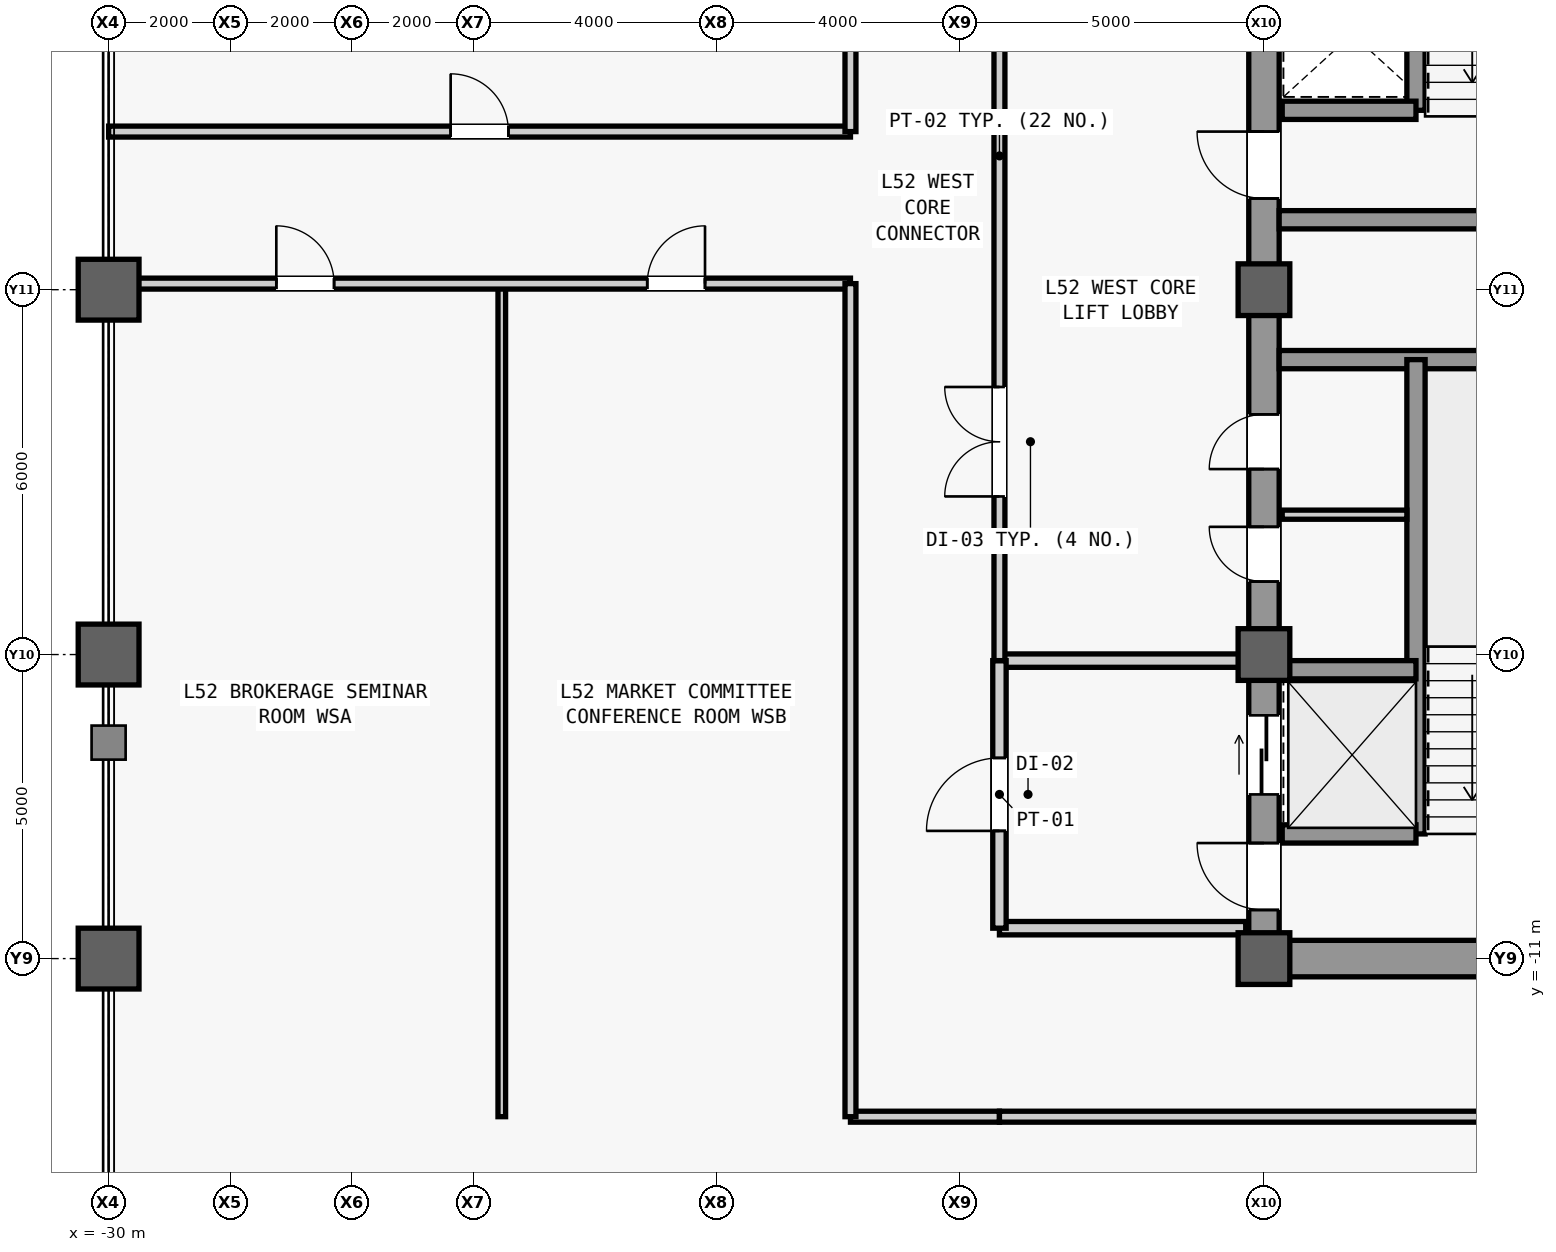
"""IFC4 building model, lengths in metres.
Left out: names, types, materials, properties, quantities, classifications, styles, units other than length and angle.
Written with IfcOpenShell. Run it as: python <this file> out.ifc"""

import sys

from ifc_helpers import new_model, si_unit, direction, frame, frame_2d, origin, origin_2d, place, context, subcontext, project, spatial, rectangle, hollow_rectangle, extrude, source, transform, mapped, element, fill, save


model = new_model("IFC4")
c1 = context("Model", 3, precision=1e-05, world=origin(), true_north=direction((0.0, 1.0)))
c2 = subcontext(c1, "Body", "Model", "MODEL_VIEW")
j1 = project(units=[si_unit("LENGTHUNIT", "METRE"), si_unit("PLANEANGLEUNIT", "RADIAN")], contexts=[c1])
p1 = place(None, origin())
s1 = spatial("IfcSite", under=j1, at=p1, CompositionType="ELEMENT")
p2 = place(p1, origin())
s2 = spatial("IfcBuilding", under=s1, at=p2, CompositionType="ELEMENT")
p3 = place(p2, frame((0.0, 0.0, 223.1)))
s3 = spatial("IfcBuildingStorey", under=s2, at=p3, CompositionType="ELEMENT", Elevation=223.1)
m1 = source(origin(), c2, "Body", "SweptSolid", [
    extrude(rectangle(XDim=22.0, YDim=0.5, at=frame_2d((11.0, 0.0))), origin(), (0.0, 0.0, 1.0), 3.78),
])
p4 = place(p3, frame((-11.0, -11.0, 0.0), z_axis=(0.0, 0.0, 1.0), x_axis=(0.0, 1.0, 0.0)))
e1 = element("IfcWall", 1, at=p4, inside=s3, PredefinedType="SHEAR", context=c2, shape_type="MappedRepresentation", body=[
    mapped(m1, transform((0.0, 0.0, 0.0), scale=1.0)),
])
m2 = source(origin(), c2, "Body", "SweptSolid", [
    extrude(rectangle(XDim=1.1, YDim=2.2, at=frame_2d((0.55, 1.1))), frame((0.0, 0.26, 0.0), z_axis=(0.0, -1.0, 0.0), x_axis=(1.0, 0.0, 0.0)), (0.0, 0.0, 1.0), 0.52),
])
p5 = place(p4, frame((0.8, 0.0, 0.0)))
e2 = element("IfcOpeningElement", 2, at=p5, cuts=e1, PredefinedType="OPENING", context=c2, shape_type="MappedRepresentation", body=[
    mapped(m2, transform((0.0, 0.0, 0.0), scale=1.0)),
])
p6 = place(p4, frame((12.5, 0.0, 0.0)))
e3 = element("IfcOpeningElement", 3, at=p6, cuts=e1, PredefinedType="OPENING", context=c2, shape_type="MappedRepresentation", body=[
    mapped(m2, transform((0.0, 0.0, 0.0), scale=1.0)),
])
m3 = source(origin(), c2, "Body", "SweptSolid", [
    extrude(rectangle(XDim=0.9, YDim=2.15, at=frame_2d((0.45, 1.075))), frame((0.0, 0.26, 0.0), z_axis=(0.0, -1.0, 0.0), x_axis=(1.0, 0.0, 0.0)), (0.0, 0.0, 1.0), 0.52),
])
p7 = place(p4, frame((6.2, 0.0, 0.0)))
e4 = element("IfcOpeningElement", 4, at=p7, cuts=e1, PredefinedType="OPENING", context=c2, shape_type="MappedRepresentation", body=[
    mapped(m3, transform((0.0, 0.0, 0.0), scale=1.0)),
])
p8 = place(p4, frame((8.05, 0.0, 0.0)))
e5 = element("IfcOpeningElement", 5, at=p8, cuts=e1, PredefinedType="OPENING", context=c2, shape_type="MappedRepresentation", body=[
    mapped(m3, transform((0.0, 0.0, 0.0), scale=1.0)),
])
m4 = source(origin(), c2, "Body", "SweptSolid", [
    extrude(rectangle(XDim=1.3, YDim=2.3, at=frame_2d((0.65, 1.15))), frame((0.0, 0.26, 0.0), z_axis=(0.0, -1.0, 0.0), x_axis=(1.0, 0.0, 0.0)), (0.0, 0.0, 1.0), 0.52),
])
p9 = place(p4, frame((2.7, 0.0, 0.0)))
e6 = element("IfcOpeningElement", 6, at=p9, cuts=e1, PredefinedType="OPENING", context=c2, shape_type="MappedRepresentation", body=[
    mapped(m4, transform((0.0, 0.0, 0.0), scale=1.0)),
])
m5 = source(origin(), c2, "Body", "SweptSolid", [
    extrude(rectangle(XDim=5.9, YDim=0.6, at=frame_2d((2.95, 0.0))), origin(), (0.0, 0.0, 1.0), 3.78),
])
p10 = place(p3, frame((-10.75, -11.0, 0.0), z_axis=(0.0, 0.0, 1.0), x_axis=(1.0, 0.0, 0.0)))
e7 = element("IfcWall", 7, at=p10, inside=s3, PredefinedType="SHEAR", context=c2, shape_type="MappedRepresentation", body=[
    mapped(m5, transform((0.0, 0.0, 0.0), scale=1.0)),
])
m6 = source(origin(), c2, "Body", "SweptSolid", [
    extrude(rectangle(XDim=5.65, YDim=0.3, at=frame_2d((2.825, 0.0))), origin(), (0.0, 0.0, 1.0), 3.78),
])
for number, where, z_axis, x_axis in (
    (8, (-10.75, -1.15, 0.0), (0.0, 0.0, 1.0), (1.0, 0.0, 0.0)),
    (9, (-10.75, 1.15, 0.0), (0.0, 0.0, 1.0), (1.0, 0.0, 0.0)),
):
    element("IfcWall", number, at=place(p3, frame(where, z_axis=z_axis, x_axis=x_axis)), inside=s3, PredefinedType="SHEAR", context=c2, shape_type="MappedRepresentation", body=[
        mapped(m6, transform((0.0, 0.0, 0.0), scale=1.0)),
    ])
m7 = source(origin(), c2, "Body", "SweptSolid", [
    extrude(hollow_rectangle(XDim=1.0, YDim=1.0, WallThickness=0.055, at=origin_2d()), origin(), (0.0, 0.0, 1.0), 4.0),
])
for number, where, z_axis, x_axis in (
    (10, (-30.0, -11.0, 0.0), (0.0, 0.0, 1.0), (1.0, 0.0, 0.0)),
    (11, (-30.0, -6.0, 0.0), (0.0, 0.0, 1.0), (1.0, 0.0, 0.0)),
    (12, (-30.0, 0.0, 0.0), (0.0, 0.0, 1.0), (1.0, 0.0, 0.0)),
):
    element("IfcColumn", number, at=place(p3, frame(where, z_axis=z_axis, x_axis=x_axis)), inside=s3, PredefinedType="COLUMN", context=c2, shape_type="MappedRepresentation", body=[
        mapped(m7, transform((0.0, 0.0, 0.0), scale=1.0)),
    ])
m8 = source(origin(), c2, "Body", "SweptSolid", [
    extrude(rectangle(XDim=0.85, YDim=0.85, at=origin_2d()), origin(), (0.0, 0.0, 1.0), 4.0),
])
for number, where, z_axis, x_axis in (
    (13, (-11.0, -11.0, 0.0), (0.0, 0.0, 1.0), (1.0, 0.0, 0.0)),
    (14, (-11.0, -6.0, 0.0), (0.0, 0.0, 1.0), (1.0, 0.0, 0.0)),
    (15, (-11.0, 0.0, 0.0), (0.0, 0.0, 1.0), (1.0, 0.0, 0.0)),
):
    element("IfcColumn", number, at=place(p3, frame(where, z_axis=z_axis, x_axis=x_axis)), inside=s3, PredefinedType="COLUMN", context=c2, shape_type="MappedRepresentation", body=[
        mapped(m8, transform((0.0, 0.0, 0.0), scale=1.0)),
    ])
m9 = source(origin(), c2, "Body", "SweptSolid", [
    extrude(rectangle(XDim=7.8, YDim=0.3, at=frame_2d((3.9, 0.0))), origin(), (0.0, 0.0, 1.0), 3.78),
])
p11 = place(p3, frame((-8.5, -8.95, 0.0), z_axis=(0.0, 0.0, 1.0), x_axis=(0.0, 1.0, 0.0)))
e16 = element("IfcWall", 16, at=p11, inside=s3, PredefinedType="SHEAR", context=c2, shape_type="MappedRepresentation", body=[
    mapped(m9, transform((0.0, 0.0, 0.0), scale=1.0)),
])
m10 = source(origin(), c2, "Body", "SweptSolid", [
    extrude(rectangle(XDim=2.2, YDim=0.3, at=frame_2d((1.1, 0.0))), origin(), (0.0, 0.0, 1.0), 3.78),
])
for number, where, z_axis, x_axis in (
    (17, (-10.7, -8.95, 0.0), (0.0, 0.0, 1.0), (1.0, 0.0, 0.0)),
    (18, (-10.7, -6.25, 0.0), (0.0, 0.0, 1.0), (1.0, 0.0, 0.0)),
):
    element("IfcWall", number, at=place(p3, frame(where, z_axis=z_axis, x_axis=x_axis)), inside=s3, PredefinedType="SHEAR", context=c2, shape_type="MappedRepresentation", body=[
        mapped(m10, transform((0.0, 0.0, 0.0), scale=1.0)),
    ])
m11 = source(origin(), c2, "Body", "SweptSolid", [
    extrude(rectangle(XDim=7.75, YDim=0.3, at=frame_2d((3.875, 0.0))), origin(), (0.0, 0.0, 1.0), 3.78),
])
p12 = place(p3, frame((-8.5, 2.95, 0.0), z_axis=(0.0, 0.0, 1.0), x_axis=(0.0, 1.0, 0.0)))
e19 = element("IfcWall", 19, at=p12, inside=s3, PredefinedType="SHEAR", context=c2, shape_type="MappedRepresentation", body=[
    mapped(m11, transform((0.0, 0.0, 0.0), scale=1.0)),
])
p13 = place(p3, frame((-10.7, 2.95, 0.0), z_axis=(0.0, 0.0, 1.0), x_axis=(1.0, 0.0, 0.0)))
e20 = element("IfcWall", 20, at=p13, inside=s3, PredefinedType="SHEAR", context=c2, shape_type="MappedRepresentation", body=[
    mapped(m10, transform((0.0, 0.0, 0.0), scale=1.0)),
])
m12 = source(origin(), c2, "Body", "SweptSolid", [
    extrude(rectangle(XDim=2.05, YDim=0.15, at=frame_2d((1.025, 0.0))), origin(), (0.0, 0.0, 1.0), 3.78),
])
p14 = place(p3, frame((-10.7, -3.7, 0.0), z_axis=(0.0, 0.0, 1.0), x_axis=(1.0, 0.0, 0.0)))
e21 = element("IfcWall", 21, at=p14, inside=s3, PredefinedType="PARTITIONING", context=c2, shape_type="MappedRepresentation", body=[
    mapped(m12, transform((0.0, 0.0, 0.0), scale=1.0)),
])
m13 = source(origin(), c2, "Body", "SweptSolid", [
    extrude(rectangle(XDim=4.05, YDim=0.22, at=frame_2d((2.025, 0.0))), origin(), (0.0, 0.0, 1.0), 3.78),
])
p15 = place(p3, frame((-15.35, -10.5, 0.0), z_axis=(0.0, 0.0, 1.0), x_axis=(1.0, 0.0, 0.0)))
e22 = element("IfcWall", 22, at=p15, inside=s3, PredefinedType="PARTITIONING", context=c2, shape_type="MappedRepresentation", body=[
    mapped(m13, transform((0.0, 0.0, 0.0), scale=1.0)),
])
m14 = source(origin(), c2, "Body", "SweptSolid", [
    extrude(rectangle(XDim=4.05, YDim=0.22, at=frame_2d((2.025, 0.0))), origin(), (0.0, 0.0, 1.0), 3.085),
])
p16 = place(p3, frame((-15.35, -6.1, 0.0), z_axis=(0.0, 0.0, 1.0), x_axis=(1.0, 0.0, 0.0)))
e23 = element("IfcWall", 23, at=p16, inside=s3, PredefinedType="PARTITIONING", context=c2, shape_type="MappedRepresentation", body=[
    mapped(m14, transform((0.0, 0.0, 0.0), scale=1.0)),
])
m15 = source(origin(), c2, "Body", "SweptSolid", [
    extrude(rectangle(XDim=4.4, YDim=0.22, at=frame_2d((2.2, 0.0))), origin(), (0.0, 0.0, 1.0), 3.78),
])
p17 = place(p3, frame((-15.35, -10.5, 0.0), z_axis=(0.0, 0.0, 1.0), x_axis=(0.0, 1.0, 0.0)))
e24 = element("IfcWall", 24, at=p17, inside=s3, PredefinedType="PARTITIONING", context=c2, shape_type="MappedRepresentation", body=[
    mapped(m15, transform((0.0, 0.0, 0.0), scale=1.0)),
])
m16 = source(origin(), c2, "Body", "SweptSolid", [
    extrude(rectangle(XDim=1.2, YDim=2.2, at=frame_2d((0.6, 1.1))), frame((0.0, 0.12, 0.0), z_axis=(0.0, -1.0, 0.0), x_axis=(1.0, 0.0, 0.0)), (0.0, 0.0, 1.0), 0.24),
])
p18 = place(p17, frame((1.6, 0.0, 0.0)))
e25 = element("IfcOpeningElement", 25, at=p18, cuts=e24, PredefinedType="OPENING", context=c2, shape_type="MappedRepresentation", body=[
    mapped(m16, transform((0.0, 0.0, 0.0), scale=1.0)),
])
m17 = source(origin(), c2, "Body", "SweptSolid", [
    extrude(rectangle(XDim=16.6, YDim=0.18, at=frame_2d((8.3, 0.0))), origin(), (0.0, 0.0, 1.0), 3.78),
])
p19 = place(p3, frame((-15.35, -6.1, 0.0), z_axis=(0.0, 0.0, 1.0), x_axis=(0.0, 1.0, 0.0)))
e26 = element("IfcWall", 26, at=p19, inside=s3, PredefinedType="PARTITIONING", context=c2, shape_type="MappedRepresentation", body=[
    mapped(m17, transform((0.0, 0.0, 0.0), scale=1.0)),
])
m18 = source(origin(), c2, "Body", "SweptSolid", [
    extrude(rectangle(XDim=1.8, YDim=2.25, at=frame_2d((0.9, 1.125))), frame((0.0, 0.1, 0.0), z_axis=(0.0, -1.0, 0.0), x_axis=(1.0, 0.0, 0.0)), (0.0, 0.0, 1.0), 0.2),
])
p20 = place(p19, frame((2.7, 0.0, 0.0)))
e27 = element("IfcOpeningElement", 27, at=p20, cuts=e26, PredefinedType="OPENING", context=c2, shape_type="MappedRepresentation", body=[
    mapped(m18, transform((0.0, 0.0, 0.0), scale=1.0)),
])
p21 = place(p19, frame((11.0, 0.0, 0.0)))
e28 = element("IfcOpeningElement", 28, at=p21, cuts=e26, PredefinedType="OPENING", context=c2, shape_type="MappedRepresentation", body=[
    mapped(m18, transform((0.0, 0.0, 0.0), scale=1.0)),
])
m19 = source(origin(), c2, "Body", "SweptSolid", [
    extrude(rectangle(XDim=2.45, YDim=0.18, at=frame_2d((1.225, 0.0))), origin(), (0.0, 0.0, 1.0), 3.78),
])
p22 = place(p3, frame((-17.8, -13.6, 0.0), z_axis=(0.0, 0.0, 1.0), x_axis=(1.0, 0.0, 0.0)))
e29 = element("IfcWall", 29, at=p22, inside=s3, PredefinedType="PARTITIONING", context=c2, shape_type="MappedRepresentation", body=[
    mapped(m19, transform((0.0, 0.0, 0.0), scale=1.0)),
])
m20 = source(origin(), c2, "Body", "SweptSolid", [
    extrude(rectangle(XDim=20.35, YDim=0.18, at=frame_2d((10.175, 0.0))), origin(), (0.0, 0.0, 1.0), 3.78),
])
p23 = place(p3, frame((-15.35, -13.6, 0.0), z_axis=(0.0, 0.0, 1.0), x_axis=(1.0, 0.0, 0.0)))
e30 = element("IfcWall", 30, at=p23, inside=s3, PredefinedType="PARTITIONING", context=c2, shape_type="MappedRepresentation", body=[
    mapped(m20, transform((0.0, 0.0, 0.0), scale=1.0)),
])
m21 = source(origin(), c2, "Body", "SweptSolid", [
    extrude(rectangle(XDim=13.7, YDim=0.125, at=frame_2d((6.85, 0.0))), origin(), (0.0, 0.0, 1.0), 3.78),
])
p24 = place(p3, frame((-23.534, -13.6, 0.0), z_axis=(0.0, 0.0, 1.0), x_axis=(0.0, 1.0, 0.0)))
e31 = element("IfcWall", 31, at=p24, inside=s3, PredefinedType="PARTITIONING", context=c2, shape_type="MappedRepresentation", body=[
    mapped(m21, transform((0.0, 0.0, 0.0), scale=1.0)),
])
m22 = source(origin(), c2, "Body", "SweptSolid", [
    extrude(rectangle(XDim=12.2, YDim=0.18, at=frame_2d((6.1, 0.0))), origin(), (0.0, 0.0, 1.0), 3.085),
])
p25 = place(p3, frame((-30.0, 0.1, 0.0), z_axis=(0.0, 0.0, 1.0), x_axis=(1.0, 0.0, 0.0)))
e32 = element("IfcWall", 32, at=p25, inside=s3, PredefinedType="PARTITIONING", context=c2, shape_type="MappedRepresentation", body=[
    mapped(m22, transform((0.0, 0.0, 0.0), scale=1.0)),
])
m23 = source(origin(), c2, "Body", "SweptSolid", [
    extrude(rectangle(XDim=0.95, YDim=2.15, at=frame_2d((0.475, 1.075))), frame((0.0, 0.1, 0.0), z_axis=(0.0, -1.0, 0.0), x_axis=(1.0, 0.0, 0.0)), (0.0, 0.0, 1.0), 0.2),
])
p26 = place(p25, frame((2.758, 0.0, 0.0)))
e33 = element("IfcOpeningElement", 33, at=p26, cuts=e32, PredefinedType="OPENING", context=c2, shape_type="MappedRepresentation", body=[
    mapped(m23, transform((0.0, 0.0, 0.0), scale=1.0)),
])
p27 = place(p25, frame((8.858, 0.0, 0.0)))
e34 = element("IfcOpeningElement", 34, at=p27, cuts=e32, PredefinedType="OPENING", context=c2, shape_type="MappedRepresentation", body=[
    mapped(m23, transform((0.0, 0.0, 0.0), scale=1.0)),
])
m24 = source(origin(), c2, "Body", "SweptSolid", [
    extrude(rectangle(XDim=13.7, YDim=0.18, at=frame_2d((6.85, 0.0))), origin(), (0.0, 0.0, 1.0), 3.78),
])
p28 = place(p3, frame((-17.8, -13.6, 0.0), z_axis=(0.0, 0.0, 1.0), x_axis=(0.0, 1.0, 0.0)))
e35 = element("IfcWall", 35, at=p28, inside=s3, PredefinedType="PARTITIONING", context=c2, shape_type="MappedRepresentation", body=[
    mapped(m24, transform((0.0, 0.0, 0.0), scale=1.0)),
])
m25 = source(origin(), c2, "Body", "SweptSolid", [
    extrude(rectangle(XDim=12.2, YDim=0.18, at=frame_2d((6.1, 0.0))), origin(), (0.0, 0.0, 1.0), 3.78),
])
p29 = place(p3, frame((-30.0, 2.6, 0.0), z_axis=(0.0, 0.0, 1.0), x_axis=(1.0, 0.0, 0.0)))
e36 = element("IfcWall", 36, at=p29, inside=s3, PredefinedType="PARTITIONING", context=c2, shape_type="MappedRepresentation", body=[
    mapped(m25, transform((0.0, 0.0, 0.0), scale=1.0)),
])
p30 = place(p29, frame((5.625, 0.0, 0.0)))
e37 = element("IfcOpeningElement", 37, at=p30, cuts=e36, PredefinedType="OPENING", context=c2, shape_type="MappedRepresentation", body=[
    mapped(m23, transform((0.0, 0.0, 0.0), scale=1.0)),
])
m26 = source(origin(), c2, "Body", "SweptSolid", [
    extrude(rectangle(XDim=7.9, YDim=0.18, at=frame_2d((3.95, 0.0))), origin(), (0.0, 0.0, 1.0), 3.78),
])
p31 = place(p3, frame((-17.8, 2.6, 0.0), z_axis=(0.0, 0.0, 1.0), x_axis=(0.0, 1.0, 0.0)))
e38 = element("IfcWall", 38, at=p31, inside=s3, PredefinedType="PARTITIONING", context=c2, shape_type="MappedRepresentation", body=[
    mapped(m26, transform((0.0, 0.0, 0.0), scale=1.0)),
])
m27 = source(origin(), c2, "Body", "SweptSolid", [
    extrude(rectangle(XDim=1.1, YDim=2.2, at=frame_2d((0.55, 1.1))), frame((0.0, 0.025, 0.0), z_axis=(0.0, -1.0, 0.0), x_axis=(1.0, 0.0, 0.0)), (0.0, 0.0, 1.0), 0.05),
])
p32 = place(p5, origin())
e39 = element("IfcDoor", 39, at=p32, inside=s3, OperationType="SINGLE_SWING_RIGHT", PredefinedType="DOOR", context=c2, shape_type="MappedRepresentation", body=[
    mapped(m27, transform((0.0, 0.0, 0.0), scale=1.0)),
])
fill(e2, e39)
p33 = place(p6, origin())
e40 = element("IfcDoor", 40, at=p33, inside=s3, OperationType="SINGLE_SWING_RIGHT", PredefinedType="DOOR", context=c2, shape_type="MappedRepresentation", body=[
    mapped(m27, transform((0.0, 0.0, 0.0), scale=1.0)),
])
fill(e3, e40)
m28 = source(origin(), c2, "Body", "SweptSolid", [
    extrude(rectangle(XDim=0.9, YDim=2.15, at=frame_2d((0.45, 1.075))), frame((0.0, 0.025, 0.0), z_axis=(0.0, -1.0, 0.0), x_axis=(1.0, 0.0, 0.0)), (0.0, 0.0, 1.0), 0.05),
])
p34 = place(p7, origin())
e41 = element("IfcDoor", 41, at=p34, inside=s3, OperationType="SINGLE_SWING_RIGHT", PredefinedType="DOOR", context=c2, shape_type="MappedRepresentation", body=[
    mapped(m28, transform((0.0, 0.0, 0.0), scale=1.0)),
])
fill(e4, e41)
p35 = place(p8, origin())
e42 = element("IfcDoor", 42, at=p35, inside=s3, OperationType="SINGLE_SWING_LEFT", PredefinedType="DOOR", context=c2, shape_type="MappedRepresentation", body=[
    mapped(m28, transform((0.0, 0.0, 0.0), scale=1.0)),
])
fill(e5, e42)
m29 = source(origin(), c2, "Body", "SweptSolid", [
    extrude(rectangle(XDim=1.2, YDim=2.2, at=frame_2d((0.6, 1.1))), frame((0.0, 0.025, 0.0), z_axis=(0.0, -1.0, 0.0), x_axis=(1.0, 0.0, 0.0)), (0.0, 0.0, 1.0), 0.05),
])
p36 = place(p18, origin())
e43 = element("IfcDoor", 43, at=p36, inside=s3, OperationType="SINGLE_SWING_LEFT", PredefinedType="DOOR", context=c2, shape_type="MappedRepresentation", body=[
    mapped(m29, transform((0.0, 0.0, 0.0), scale=1.0)),
])
fill(e25, e43)
m30 = source(origin(), c2, "Body", "SweptSolid", [
    extrude(rectangle(XDim=1.8, YDim=2.25, at=frame_2d((0.9, 1.125))), frame((0.0, 0.025, 0.0), z_axis=(0.0, -1.0, 0.0), x_axis=(1.0, 0.0, 0.0)), (0.0, 0.0, 1.0), 0.05),
])
p37 = place(p20, origin())
e44 = element("IfcDoor", 44, at=p37, inside=s3, OperationType="SINGLE_SWING_LEFT", PredefinedType="DOOR", context=c2, shape_type="MappedRepresentation", body=[
    mapped(m30, transform((0.0, 0.0, 0.0), scale=1.0)),
])
fill(e27, e44)
m31 = source(origin(), c2, "Body", "SweptSolid", [
    extrude(rectangle(XDim=0.95, YDim=2.15, at=frame_2d((0.475, 1.075))), frame((0.0, 0.025, 0.0), z_axis=(0.0, -1.0, 0.0), x_axis=(1.0, 0.0, 0.0)), (0.0, 0.0, 1.0), 0.05),
])
p38 = place(p26, origin())
e45 = element("IfcDoor", 45, at=p38, inside=s3, OperationType="SINGLE_SWING_LEFT", PredefinedType="DOOR", context=c2, shape_type="MappedRepresentation", body=[
    mapped(m31, transform((0.0, 0.0, 0.0), scale=1.0)),
])
fill(e33, e45)
p39 = place(p27, origin())
e46 = element("IfcDoor", 46, at=p39, inside=s3, OperationType="SINGLE_SWING_RIGHT", PredefinedType="DOOR", context=c2, shape_type="MappedRepresentation", body=[
    mapped(m31, transform((0.0, 0.0, 0.0), scale=1.0)),
])
fill(e34, e46)
p40 = place(p30, origin())
e47 = element("IfcDoor", 47, at=p40, inside=s3, OperationType="SINGLE_SWING_LEFT", PredefinedType="DOOR", context=c2, shape_type="MappedRepresentation", body=[
    mapped(m31, transform((0.0, 0.0, 0.0), scale=1.0)),
])
fill(e37, e47)
m32 = source(origin(), c2, "Body", "SweptSolid", [
    extrude(rectangle(XDim=1.3, YDim=2.3, at=frame_2d((0.65, 1.15))), frame((0.0, 0.025, 0.0), z_axis=(0.0, -1.0, 0.0), x_axis=(1.0, 0.0, 0.0)), (0.0, 0.0, 1.0), 0.05),
])
p41 = place(p9, origin())
e48 = element("IfcDoor", 48, at=p41, inside=s3, OperationType="SLIDING_TO_LEFT", PredefinedType="DOOR", context=c2, shape_type="MappedRepresentation", body=[
    mapped(m32, transform((0.0, 0.0, 0.0), scale=1.0)),
])
fill(e6, e48)
save(model, sys.argv[1])
